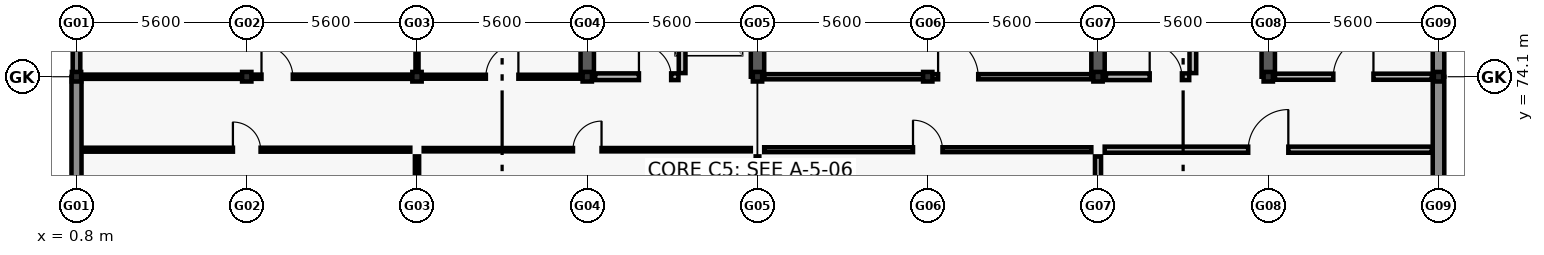
"""IFC4 building model, lengths in metres.
Left out: names, types, materials, properties, quantities, classifications, styles, units other than length and angle.
Written with IfcOpenShell. Run it as: python <this file> out.ifc"""

import sys

from ifc_helpers import new_model, si_unit, direction, frame, frame_2d, origin, origin_2d, place, context, subcontext, project, spatial, rectangle, i_section, extrude, element, fill, save


model = new_model("IFC4")
c1 = context("Model", 3, precision=1e-05, world=origin(), true_north=direction((0.0, 1.0)))
c2 = subcontext(c1, "Body", "Model", "MODEL_VIEW")
j1 = project(units=[si_unit("LENGTHUNIT", "METRE"), si_unit("PLANEANGLEUNIT", "RADIAN")], contexts=[c1])
p1 = place(None, origin())
s1 = spatial("IfcSite", under=j1, at=p1, CompositionType="ELEMENT")
p2 = place(p1, origin())
s2 = spatial("IfcBuilding", under=s1, at=p2, CompositionType="ELEMENT")
p3 = place(p2, origin())
s3 = spatial("IfcBuildingStorey", under=s2, at=p3, CompositionType="ELEMENT", Elevation=0.0)
for number, where, z_axis, x_axis in (
    (1, (0.8, 74.1, 0.0), (0.0, 0.0, 1.0), (1.0, 0.0, 0.0)),
    (2, (6.4, 74.1, 0.0), (0.0, 0.0, 1.0), (1.0, 0.0, 0.0)),
    (3, (12.0, 74.1, 0.0), (0.0, 0.0, 1.0), (1.0, 0.0, 0.0)),
    (4, (17.6, 74.1, 0.0), (0.0, 0.0, 1.0), (1.0, 0.0, 0.0)),
    (5, (23.2, 74.1, 0.0), (0.0, 0.0, 1.0), (1.0, 0.0, 0.0)),
    (6, (28.8, 74.1, 0.0), (0.0, 0.0, 1.0), (1.0, 0.0, 0.0)),
    (7, (34.4, 74.1, 0.0), (0.0, 0.0, 1.0), (1.0, 0.0, 0.0)),
    (8, (40.0, 74.1, 0.0), (0.0, 0.0, 1.0), (1.0, 0.0, 0.0)),
    (9, (45.6, 74.1, 0.0), (0.0, 0.0, 1.0), (1.0, 0.0, 0.0)),
):
    element("IfcColumn", number, at=place(p3, frame(where, z_axis=z_axis, x_axis=x_axis)), inside=s3, PredefinedType="COLUMN", context=c2, shape_type="SweptSolid", body=[
        extrude(i_section(OverallWidth=0.307, OverallDepth=0.315, WebThickness=0.012, FlangeThickness=0.019, FilletRadius=0.017, at=origin_2d()), origin(), (0.0, 0.0, 1.0), 5.4),
    ])
for number, where, z_axis, x_axis in (
    (10, (17.6, 74.1, 0.0), (0.0, 0.0, 1.0), (0.0, 1.0, 0.0)),
    (11, (23.2, 74.1, 0.0), (0.0, 0.0, 1.0), (0.0, 1.0, 0.0)),
    (12, (34.4, 74.1, 0.0), (0.0, 0.0, 1.0), (0.0, 1.0, 0.0)),
    (13, (40.0, 74.1, 0.0), (0.0, 0.0, 1.0), (0.0, 1.0, 0.0)),
):
    element("IfcWall", number, at=place(p3, frame(where, z_axis=z_axis, x_axis=x_axis)), inside=s3, PredefinedType="SHEAR", context=c2, shape_type="SweptSolid", body=[
        extrude(rectangle(XDim=6.68, YDim=0.44, at=frame_2d((3.34, 0.0))), origin(), (0.0, 0.0, 1.0), 5.16),
    ])
p4 = place(p3, frame((0.8, 67.205, 0.0), z_axis=(0.0, 0.0, 1.0), x_axis=(0.0, 1.0, 0.0)))
e14 = element("IfcWall", 14, at=p4, inside=s3, PredefinedType="SOLIDWALL", context=c2, shape_type="SweptSolid", body=[
    extrude(rectangle(XDim=6.89, YDim=0.33, at=frame_2d((3.445, 0.0))), origin(), (0.0, 0.0, 1.0), 4.52),
])
p5 = place(p4, frame((1.312, 0.0, 0.8)))
e15 = element("IfcOpeningElement", 15, at=p5, cuts=e14, PredefinedType="OPENING", context=c2, shape_type="SweptSolid", body=[
    extrude(rectangle(XDim=1.9, YDim=1.8, at=frame_2d((0.95, 0.9))), frame((0.0, 0.175, 0.0), z_axis=(0.0, -1.0, 0.0), x_axis=(1.0, 0.0, 0.0)), (0.0, 0.0, 1.0), 0.35),
])
p6 = place(p3, frame((45.6, 74.095, 0.0), z_axis=(0.0, 0.0, 1.0), x_axis=(0.0, -1.0, 0.0)))
e16 = element("IfcWall", 16, at=p6, inside=s3, PredefinedType="SOLIDWALL", context=c2, shape_type="SweptSolid", body=[
    extrude(rectangle(XDim=6.89, YDim=0.38, at=frame_2d((3.445, 0.0))), origin(), (0.0, 0.0, 1.0), 4.52),
])
p7 = place(p3, frame((0.8, 74.105, 0.0), z_axis=(0.0, 0.0, 1.0), x_axis=(0.0, 1.0, 0.0)))
e17 = element("IfcWall", 17, at=p7, inside=s3, PredefinedType="SOLIDWALL", context=c2, shape_type="SweptSolid", body=[
    extrude(rectangle(XDim=6.89, YDim=0.25, at=frame_2d((3.445, 0.0))), origin(), (0.0, 0.0, 1.0), 4.52),
])
p8 = place(p7, frame((2.42, 0.0, 0.8)))
e18 = element("IfcOpeningElement", 18, at=p8, cuts=e17, PredefinedType="OPENING", context=c2, shape_type="SweptSolid", body=[
    extrude(rectangle(XDim=2.05, YDim=1.8, at=frame_2d((1.025, 0.9))), frame((0.0, 0.135, 0.0), z_axis=(0.0, -1.0, 0.0), x_axis=(1.0, 0.0, 0.0)), (0.0, 0.0, 1.0), 0.27),
])
p9 = place(p3, frame((45.6, 80.995, 0.0), z_axis=(0.0, 0.0, 1.0), x_axis=(0.0, -1.0, 0.0)))
e19 = element("IfcWall", 19, at=p9, inside=s3, PredefinedType="SOLIDWALL", context=c2, shape_type="SweptSolid", body=[
    extrude(rectangle(XDim=6.89, YDim=0.38, at=frame_2d((3.445, 0.0))), origin(), (0.0, 0.0, 1.0), 4.52),
])
p10 = place(p3, frame((20.72, 74.22, 0.0), z_axis=(0.0, 0.0, 1.0), x_axis=(0.0, 1.0, 0.0)))
e20 = element("IfcWall", 20, at=p10, inside=s3, PredefinedType="SOLIDWALL", context=c2, shape_type="SweptSolid", body=[
    extrude(rectangle(XDim=6.555, YDim=0.22, at=frame_2d((3.277, 0.0))), origin(), (0.0, 0.0, 1.0), 5.16),
])
p11 = place(p3, frame((17.86, 74.1, 0.0), z_axis=(0.0, 0.0, 1.0), x_axis=(1.0, 0.0, 0.0)))
e21 = element("IfcWall", 21, at=p11, inside=s3, PredefinedType="SOLIDWALL", context=c2, shape_type="SweptSolid", body=[
    extrude(rectangle(XDim=2.74, YDim=0.22, at=frame_2d((1.37, 0.0))), origin(), (0.0, 0.0, 1.0), 4.52),
])
p12 = place(p11, frame((1.44, 0.0, 0.0)))
e22 = element("IfcOpeningElement", 22, at=p12, cuts=e21, PredefinedType="OPENING", context=c2, shape_type="SweptSolid", body=[
    extrude(rectangle(XDim=1.06, YDim=2.1, at=frame_2d((0.53, 1.05))), frame((0.0, 0.12, 0.0), z_axis=(0.0, -1.0, 0.0), x_axis=(1.0, 0.0, 0.0)), (0.0, 0.0, 1.0), 0.24),
])
p13 = place(p3, frame((37.52, 74.22, 0.0), z_axis=(0.0, 0.0, 1.0), x_axis=(0.0, 1.0, 0.0)))
e23 = element("IfcWall", 23, at=p13, inside=s3, PredefinedType="SOLIDWALL", context=c2, shape_type="SweptSolid", body=[
    extrude(rectangle(XDim=6.555, YDim=0.22, at=frame_2d((3.277, 0.0))), origin(), (0.0, 0.0, 1.0), 5.16),
])
p14 = place(p3, frame((34.66, 74.1, 0.0), z_axis=(0.0, 0.0, 1.0), x_axis=(1.0, 0.0, 0.0)))
e24 = element("IfcWall", 24, at=p14, inside=s3, PredefinedType="SOLIDWALL", context=c2, shape_type="SweptSolid", body=[
    extrude(rectangle(XDim=2.74, YDim=0.22, at=frame_2d((1.37, 0.0))), origin(), (0.0, 0.0, 1.0), 4.52),
])
p15 = place(p14, frame((1.44, 0.0, 0.0)))
e25 = element("IfcOpeningElement", 25, at=p15, cuts=e24, PredefinedType="OPENING", context=c2, shape_type="SweptSolid", body=[
    extrude(rectangle(XDim=1.06, YDim=2.1, at=frame_2d((0.53, 1.05))), frame((0.0, 0.12, 0.0), z_axis=(0.0, -1.0, 0.0), x_axis=(1.0, 0.0, 0.0)), (0.0, 0.0, 1.0), 0.24),
])
p16 = place(p3, frame((12.0, 60.52, 0.0), z_axis=(0.0, 0.0, 1.0), x_axis=(0.0, 1.0, 0.0)))
e26 = element("IfcWall", 26, at=p16, inside=s3, PredefinedType="PARTITIONING", context=c2, shape_type="SweptSolid", body=[
    extrude(rectangle(XDim=10.96, YDim=0.14, at=frame_2d((5.48, 0.0))), origin(), (0.0, 0.0, 1.0), 4.5),
])
p17 = place(p3, frame((1.02, 71.7, 0.0), z_axis=(0.0, 0.0, 1.0), x_axis=(1.0, 0.0, 0.0)))
e27 = element("IfcWall", 27, at=p17, inside=s3, PredefinedType="PARTITIONING", context=c2, shape_type="SweptSolid", body=[
    extrude(rectangle(XDim=10.76, YDim=0.13, at=frame_2d((5.38, 0.0))), origin(), (0.0, 0.0, 1.0), 4.5),
])
p18 = place(p17, frame((4.925, 0.0, 0.0)))
e28 = element("IfcOpeningElement", 28, at=p18, cuts=e27, PredefinedType="OPENING", context=c2, shape_type="SweptSolid", body=[
    extrude(rectangle(XDim=0.91, YDim=2.06, at=frame_2d((0.455, 1.03))), frame((0.0, 0.075, 0.0), z_axis=(0.0, -1.0, 0.0), x_axis=(1.0, 0.0, 0.0)), (0.0, 0.0, 1.0), 0.15),
])
p19 = place(p3, frame((23.2, 60.52, 0.0), z_axis=(0.0, 0.0, 1.0), x_axis=(0.0, 1.0, 0.0)))
e29 = element("IfcWall", 29, at=p19, inside=s3, PredefinedType="PARTITIONING", context=c2, shape_type="SweptSolid", body=[
    extrude(rectangle(XDim=10.96, YDim=0.12, at=frame_2d((5.48, 0.0))), origin(), (0.0, 0.0, 1.0), 4.5),
])
p20 = place(p3, frame((12.22, 71.7, 0.0), z_axis=(0.0, 0.0, 1.0), x_axis=(1.0, 0.0, 0.0)))
e30 = element("IfcWall", 30, at=p20, inside=s3, PredefinedType="PARTITIONING", context=c2, shape_type="SweptSolid", body=[
    extrude(rectangle(XDim=10.76, YDim=0.11, at=frame_2d((5.38, 0.0))), origin(), (0.0, 0.0, 1.0), 4.5),
])
p21 = place(p20, frame((4.91, 0.0, 0.0)))
e31 = element("IfcOpeningElement", 31, at=p21, cuts=e30, PredefinedType="OPENING", context=c2, shape_type="SweptSolid", body=[
    extrude(rectangle(XDim=0.94, YDim=2.08, at=frame_2d((0.47, 1.04))), frame((0.0, 0.065, 0.0), z_axis=(0.0, -1.0, 0.0), x_axis=(1.0, 0.0, 0.0)), (0.0, 0.0, 1.0), 0.13),
])
p22 = place(p3, frame((34.4, 60.52, 0.0), z_axis=(0.0, 0.0, 1.0), x_axis=(0.0, 1.0, 0.0)))
e32 = element("IfcWall", 32, at=p22, inside=s3, PredefinedType="PARTITIONING", context=c2, shape_type="SweptSolid", body=[
    extrude(rectangle(XDim=10.96, YDim=0.2, at=frame_2d((5.48, 0.0))), origin(), (0.0, 0.0, 1.0), 4.5),
])
p23 = place(p3, frame((23.42, 71.7, 0.0), z_axis=(0.0, 0.0, 1.0), x_axis=(1.0, 0.0, 0.0)))
e33 = element("IfcWall", 33, at=p23, inside=s3, PredefinedType="PARTITIONING", context=c2, shape_type="SweptSolid", body=[
    extrude(rectangle(XDim=10.76, YDim=0.16, at=frame_2d((5.38, 0.0))), origin(), (0.0, 0.0, 1.0), 4.5),
])
p24 = place(p23, frame((4.895, 0.0, 0.0)))
e34 = element("IfcOpeningElement", 34, at=p24, cuts=e33, PredefinedType="OPENING", context=c2, shape_type="SweptSolid", body=[
    extrude(rectangle(XDim=0.97, YDim=2.1, at=frame_2d((0.485, 1.05))), frame((0.0, 0.09, 0.0), z_axis=(0.0, -1.0, 0.0), x_axis=(1.0, 0.0, 0.0)), (0.0, 0.0, 1.0), 0.18),
])
p25 = place(p3, frame((34.62, 71.7, 0.0), z_axis=(0.0, 0.0, 1.0), x_axis=(1.0, 0.0, 0.0)))
e35 = element("IfcWall", 35, at=p25, inside=s3, PredefinedType="PARTITIONING", context=c2, shape_type="SweptSolid", body=[
    extrude(rectangle(XDim=10.76, YDim=0.2, at=frame_2d((5.38, 0.0))), origin(), (0.0, 0.0, 1.0), 4.5),
])
p26 = place(p25, frame((4.72, 0.0, 0.0)))
e36 = element("IfcOpeningElement", 36, at=p26, cuts=e35, PredefinedType="OPENING", context=c2, shape_type="SweptSolid", body=[
    extrude(rectangle(XDim=1.32, YDim=2.12, at=frame_2d((0.66, 1.06))), frame((0.0, 0.11, 0.0), z_axis=(0.0, -1.0, 0.0), x_axis=(1.0, 0.0, 0.0)), (0.0, 0.0, 1.0), 0.22),
])
p27 = place(p3, frame((1.02, 74.1, 0.0), z_axis=(0.0, 0.0, 1.0), x_axis=(1.0, 0.0, 0.0)))
e37 = element("IfcWall", 37, at=p27, inside=s3, PredefinedType="PARTITIONING", context=c2, shape_type="SweptSolid", body=[
    extrude(rectangle(XDim=10.76, YDim=0.14, at=frame_2d((5.38, 0.0))), origin(), (0.0, 0.0, 1.0), 4.5),
])
p28 = place(p27, frame((5.865, 0.0, 0.0)))
e38 = element("IfcOpeningElement", 38, at=p28, cuts=e37, PredefinedType="OPENING", context=c2, shape_type="SweptSolid", body=[
    extrude(rectangle(XDim=1.03, YDim=2.06, at=frame_2d((0.515, 1.03))), frame((0.0, 0.08, 0.0), z_axis=(0.0, -1.0, 0.0), x_axis=(1.0, 0.0, 0.0)), (0.0, 0.0, 1.0), 0.16),
])
p29 = place(p3, frame((12.22, 74.1, 0.0), z_axis=(0.0, 0.0, 1.0), x_axis=(1.0, 0.0, 0.0)))
e39 = element("IfcWall", 39, at=p29, inside=s3, PredefinedType="PARTITIONING", context=c2, shape_type="SweptSolid", body=[
    extrude(rectangle(XDim=5.16, YDim=0.13, at=frame_2d((2.58, 0.0))), origin(), (0.0, 0.0, 1.0), 4.5),
])
p30 = place(p29, frame((2.045, 0.0, 0.0)))
e40 = element("IfcOpeningElement", 40, at=p30, cuts=e39, PredefinedType="OPENING", context=c2, shape_type="SweptSolid", body=[
    extrude(rectangle(XDim=1.07, YDim=2.08, at=frame_2d((0.535, 1.04))), frame((0.0, 0.075, 0.0), z_axis=(0.0, -1.0, 0.0), x_axis=(1.0, 0.0, 0.0)), (0.0, 0.0, 1.0), 0.15),
])
p31 = place(p3, frame((23.42, 74.1, 0.0), z_axis=(0.0, 0.0, 1.0), x_axis=(1.0, 0.0, 0.0)))
e41 = element("IfcWall", 41, at=p31, inside=s3, PredefinedType="PARTITIONING", context=c2, shape_type="SweptSolid", body=[
    extrude(rectangle(XDim=10.76, YDim=0.17, at=frame_2d((5.38, 0.0))), origin(), (0.0, 0.0, 1.0), 4.5),
])
p32 = place(p31, frame((5.72, 0.0, 0.0)))
e42 = element("IfcOpeningElement", 42, at=p32, cuts=e41, PredefinedType="OPENING", context=c2, shape_type="SweptSolid", body=[
    extrude(rectangle(XDim=1.32, YDim=2.12, at=frame_2d((0.66, 1.06))), frame((0.0, 0.095, 0.0), z_axis=(0.0, -1.0, 0.0), x_axis=(1.0, 0.0, 0.0)), (0.0, 0.0, 1.0), 0.19),
])
p33 = place(p3, frame((40.22, 74.1, 0.0), z_axis=(0.0, 0.0, 1.0), x_axis=(1.0, 0.0, 0.0)))
e43 = element("IfcWall", 43, at=p33, inside=s3, PredefinedType="PARTITIONING", context=c2, shape_type="SweptSolid", body=[
    extrude(rectangle(XDim=5.16, YDim=0.2, at=frame_2d((2.58, 0.0))), origin(), (0.0, 0.0, 1.0), 4.5),
])
p34 = place(p33, frame((1.92, 0.0, 0.0)))
e44 = element("IfcOpeningElement", 44, at=p34, cuts=e43, PredefinedType="OPENING", context=c2, shape_type="SweptSolid", body=[
    extrude(rectangle(XDim=1.32, YDim=2.12, at=frame_2d((0.66, 1.06))), frame((0.0, 0.11, 0.0), z_axis=(0.0, -1.0, 0.0), x_axis=(1.0, 0.0, 0.0)), (0.0, 0.0, 1.0), 0.22),
])
p35 = place(p3, frame((12.0, 74.32, 0.0), z_axis=(0.0, 0.0, 1.0), x_axis=(0.0, 1.0, 0.0)))
e45 = element("IfcWall", 45, at=p35, inside=s3, PredefinedType="PARTITIONING", context=c2, shape_type="SweptSolid", body=[
    extrude(rectangle(XDim=6.46, YDim=0.1, at=frame_2d((3.23, 0.0))), origin(), (0.0, 0.0, 1.0), 4.5),
])
p36 = place(p12, origin())
e46 = element("IfcDoor", 46, at=p36, inside=s3, OperationType="SINGLE_SWING_LEFT", PredefinedType="DOOR", context=c2, shape_type="SweptSolid", body=[
    extrude(rectangle(XDim=1.06, YDim=2.1, at=frame_2d((0.53, 1.05))), frame((0.0, 0.025, 0.0), z_axis=(0.0, -1.0, 0.0), x_axis=(1.0, 0.0, 0.0)), (0.0, 0.0, 1.0), 0.05),
])
fill(e22, e46)
p37 = place(p15, origin())
e47 = element("IfcDoor", 47, at=p37, inside=s3, OperationType="SINGLE_SWING_LEFT", PredefinedType="DOOR", context=c2, shape_type="SweptSolid", body=[
    extrude(rectangle(XDim=1.06, YDim=2.1, at=frame_2d((0.53, 1.05))), frame((0.0, 0.025, 0.0), z_axis=(0.0, -1.0, 0.0), x_axis=(1.0, 0.0, 0.0)), (0.0, 0.0, 1.0), 0.05),
])
fill(e25, e47)
p38 = place(p18, origin())
e48 = element("IfcDoor", 48, at=p38, inside=s3, OperationType="SINGLE_SWING_LEFT", PredefinedType="DOOR", context=c2, shape_type="SweptSolid", body=[
    extrude(rectangle(XDim=0.91, YDim=2.06, at=frame_2d((0.455, 1.03))), frame((0.0, 0.025, 0.0), z_axis=(0.0, -1.0, 0.0), x_axis=(1.0, 0.0, 0.0)), (0.0, 0.0, 1.0), 0.05),
])
fill(e28, e48)
p39 = place(p21, origin())
e49 = element("IfcDoor", 49, at=p39, inside=s3, OperationType="SINGLE_SWING_RIGHT", PredefinedType="DOOR", context=c2, shape_type="SweptSolid", body=[
    extrude(rectangle(XDim=0.94, YDim=2.08, at=frame_2d((0.47, 1.04))), frame((0.0, 0.025, 0.0), z_axis=(0.0, -1.0, 0.0), x_axis=(1.0, 0.0, 0.0)), (0.0, 0.0, 1.0), 0.05),
])
fill(e31, e49)
p40 = place(p24, origin())
e50 = element("IfcDoor", 50, at=p40, inside=s3, OperationType="SINGLE_SWING_LEFT", PredefinedType="DOOR", context=c2, shape_type="SweptSolid", body=[
    extrude(rectangle(XDim=0.97, YDim=2.1, at=frame_2d((0.485, 1.05))), frame((0.0, 0.025, 0.0), z_axis=(0.0, -1.0, 0.0), x_axis=(1.0, 0.0, 0.0)), (0.0, 0.0, 1.0), 0.05),
])
fill(e34, e50)
p41 = place(p26, origin())
e51 = element("IfcDoor", 51, at=p41, inside=s3, OperationType="SINGLE_SWING_RIGHT", PredefinedType="DOOR", context=c2, shape_type="SweptSolid", body=[
    extrude(rectangle(XDim=1.32, YDim=2.12, at=frame_2d((0.66, 1.06))), frame((0.0, 0.025, 0.0), z_axis=(0.0, -1.0, 0.0), x_axis=(1.0, 0.0, 0.0)), (0.0, 0.0, 1.0), 0.05),
])
fill(e36, e51)
p42 = place(p28, origin())
e52 = element("IfcDoor", 52, at=p42, inside=s3, OperationType="SINGLE_SWING_LEFT", PredefinedType="DOOR", context=c2, shape_type="SweptSolid", body=[
    extrude(rectangle(XDim=1.03, YDim=2.06, at=frame_2d((0.515, 1.03))), frame((0.0, 0.025, 0.0), z_axis=(0.0, -1.0, 0.0), x_axis=(1.0, 0.0, 0.0)), (0.0, 0.0, 1.0), 0.05),
])
fill(e38, e52)
p43 = place(p30, origin())
e53 = element("IfcDoor", 53, at=p43, inside=s3, OperationType="SINGLE_SWING_RIGHT", PredefinedType="DOOR", context=c2, shape_type="SweptSolid", body=[
    extrude(rectangle(XDim=1.07, YDim=2.08, at=frame_2d((0.535, 1.04))), frame((0.0, 0.025, 0.0), z_axis=(0.0, -1.0, 0.0), x_axis=(1.0, 0.0, 0.0)), (0.0, 0.0, 1.0), 0.05),
])
fill(e40, e53)
p44 = place(p32, origin())
e54 = element("IfcDoor", 54, at=p44, inside=s3, OperationType="SINGLE_SWING_LEFT", PredefinedType="DOOR", context=c2, shape_type="SweptSolid", body=[
    extrude(rectangle(XDim=1.32, YDim=2.12, at=frame_2d((0.66, 1.06))), frame((0.0, 0.025, 0.0), z_axis=(0.0, -1.0, 0.0), x_axis=(1.0, 0.0, 0.0)), (0.0, 0.0, 1.0), 0.05),
])
fill(e42, e54)
p45 = place(p34, origin())
e55 = element("IfcDoor", 55, at=p45, inside=s3, OperationType="SINGLE_SWING_RIGHT", PredefinedType="DOOR", context=c2, shape_type="SweptSolid", body=[
    extrude(rectangle(XDim=1.32, YDim=2.12, at=frame_2d((0.66, 1.06))), frame((0.0, 0.025, 0.0), z_axis=(0.0, -1.0, 0.0), x_axis=(1.0, 0.0, 0.0)), (0.0, 0.0, 1.0), 0.05),
])
fill(e44, e55)
save(model, sys.argv[1])
